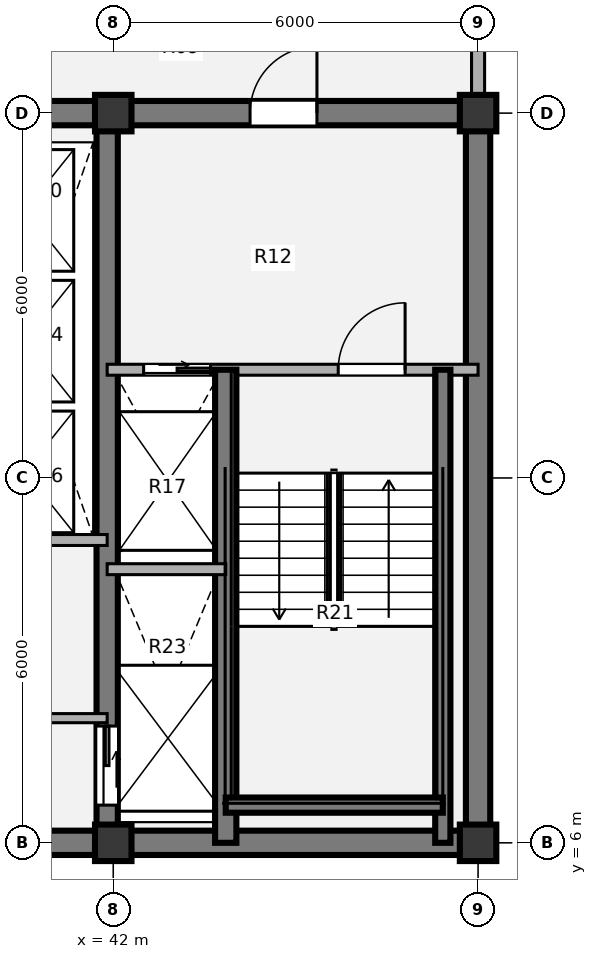
"""IFC4 building model, lengths in metres.
Left out: names, types, materials, properties, quantities, classifications, styles, units other than length and angle.
Written with IfcOpenShell. Run it as: python <this file> out.ifc"""

import sys

from ifc_helpers import new_model, si_unit, direction, frame, frame_2d, origin, origin_2d, place, context, subcontext, project, spatial, rectangle, extrude, source, transform, mapped, element, fill, save


model = new_model("IFC4")
c1 = context("Model", 3, precision=1e-05, world=origin(), true_north=direction((0.0, 1.0)))
c2 = subcontext(c1, "Body", "Model", "MODEL_VIEW")
j1 = project(units=[si_unit("LENGTHUNIT", "METRE"), si_unit("PLANEANGLEUNIT", "RADIAN")], contexts=[c1])
p1 = place(None, origin())
s1 = spatial("IfcSite", under=j1, at=p1, CompositionType="ELEMENT")
p2 = place(p1, origin())
s2 = spatial("IfcBuilding", under=s1, at=p2, CompositionType="ELEMENT")
p3 = place(p2, frame((0.0, 0.0, 257.04)))
s3 = spatial("IfcBuildingStorey", under=s2, at=p3, CompositionType="ELEMENT", Elevation=257.04)
m1 = source(origin(), c2, "Body", "SweptSolid", [
    extrude(rectangle(XDim=0.6, YDim=0.6, at=origin_2d()), origin(), (0.0, 0.0, 1.0), 3.78),
])
for number, where, z_axis, x_axis in (
    (1, (42.0, 6.0, 0.0), (0.0, 0.0, 1.0), (1.0, 0.0, 0.0)),
    (2, (48.0, 6.0, 0.0), (0.0, 0.0, 1.0), (1.0, 0.0, 0.0)),
    (3, (42.0, 18.0, 0.0), (0.0, 0.0, 1.0), (1.0, 0.0, 0.0)),
    (4, (48.0, 18.0, 0.0), (0.0, 0.0, 1.0), (1.0, 0.0, 0.0)),
):
    element("IfcColumn", number, at=place(p3, frame(where, z_axis=z_axis, x_axis=x_axis)), inside=s3, PredefinedType="COLUMN", context=c2, shape_type="MappedRepresentation", body=[
        mapped(m1, transform((0.0, 0.0, 0.0), x_axis=(1.0, 0.0, 0.0), y_axis=(0.0, 1.0, 0.0), z_axis=(0.0, 0.0, 1.0), scale=1.0)),
    ])
p4 = place(p3, frame((48.2, 6.0, 0.0), z_axis=(0.0, 0.0, 1.0), x_axis=(-1.0, 0.0, 0.0)))
e5 = element("IfcWall", 5, at=p4, inside=s3, PredefinedType="SHEAR", context=c2, shape_type="SweptSolid", body=[
    extrude(rectangle(XDim=24.4, YDim=0.4, at=frame_2d((12.2, 0.0))), origin(), (0.0, 0.0, 1.0), 3.78),
])
p5 = place(p3, frame((48.0, 18.0, 0.0), z_axis=(0.0, 0.0, 1.0), x_axis=(0.0, -1.0, 0.0)))
e6 = element("IfcWall", 6, at=p5, inside=s3, PredefinedType="SHEAR", context=c2, shape_type="SweptSolid", body=[
    extrude(rectangle(XDim=12.0, YDim=0.4, at=frame_2d((6.0, 0.0))), origin(), (0.0, 0.0, 1.0), 3.78),
])
p6 = place(p3, frame((38.8, 18.0, 0.0), z_axis=(0.0, 0.0, 1.0), x_axis=(1.0, 0.0, 0.0)))
e7 = element("IfcWall", 7, at=p6, inside=s3, PredefinedType="SHEAR", context=c2, shape_type="SweptSolid", body=[
    extrude(rectangle(XDim=9.4, YDim=0.4, at=frame_2d((4.7, 0.0))), origin(), (0.0, 0.0, 1.0), 3.78),
])
p7 = place(p6, frame((5.45, 0.0, 0.0)))
e8 = element("IfcOpeningElement", 8, at=p7, cuts=e7, PredefinedType="OPENING", context=c2, shape_type="SweptSolid", body=[
    extrude(rectangle(XDim=1.1, YDim=2.1, at=origin_2d()), frame((0.55, 0.21, 1.05), z_axis=(0.0, -1.0, 0.0), x_axis=(1.0, 0.0, 0.0)), (0.0, 0.0, 1.0), 0.42),
])
p8 = place(p3, frame((41.9, 18.0, 0.0), z_axis=(0.0, 0.0, 1.0), x_axis=(0.0, -1.0, 0.0)))
e9 = element("IfcWall", 9, at=p8, inside=s3, PredefinedType="SHEAR", context=c2, shape_type="SweptSolid", body=[
    extrude(rectangle(XDim=12.0, YDim=0.35, at=frame_2d((6.0, 0.0))), origin(), (0.0, 0.0, 1.0), 3.78),
])
p9 = place(p8, frame((10.08, 0.0, 0.0)))
e10 = element("IfcOpeningElement", 10, at=p9, cuts=e9, PredefinedType="OPENING", context=c2, shape_type="SweptSolid", body=[
    extrude(rectangle(XDim=1.3, YDim=2.1, at=origin_2d()), frame((0.65, 0.185, 1.05), z_axis=(0.0, -1.0, 0.0), x_axis=(1.0, 0.0, 0.0)), (0.0, 0.0, 1.0), 0.37),
])
p10 = place(p3, frame((48.0, 21.05, 0.0), z_axis=(0.0, 0.0, 1.0), x_axis=(0.0, -1.0, 0.0)))
e11 = element("IfcWall", 11, at=p10, inside=s3, PredefinedType="SOLIDWALL", context=c2, shape_type="SweptSolid", body=[
    extrude(rectangle(XDim=2.77, YDim=0.215, at=frame_2d((1.385, 0.0))), origin(), (0.0, 0.0, 1.0), 2.718),
])
p11 = place(p3, frame((38.0, 8.05, 0.0), z_axis=(0.0, 0.0, 1.0), x_axis=(1.0, 0.0, 0.0)))
e12 = element("IfcWall", 12, at=p11, inside=s3, PredefinedType="PARTITIONING", context=c2, shape_type="SweptSolid", body=[
    extrude(rectangle(XDim=3.9, YDim=0.15, at=frame_2d((1.95, 0.0))), origin(), (0.0, 0.0, 1.0), 3.5),
])
p12 = place(p11, frame((1.45, 0.0, 0.0)))
e13 = element("IfcOpeningElement", 13, at=p12, cuts=e12, PredefinedType="OPENING", context=c2, shape_type="SweptSolid", body=[
    extrude(rectangle(XDim=0.86, YDim=2.1, at=origin_2d()), frame((0.43, 0.085, 1.05), z_axis=(0.0, -1.0, 0.0), x_axis=(1.0, 0.0, 0.0)), (0.0, 0.0, 1.0), 0.17),
])
p13 = place(p3, frame((38.0, 10.98, 0.0), z_axis=(0.0, 0.0, 1.0), x_axis=(1.0, 0.0, 0.0)))
e14 = element("IfcWall", 14, at=p13, inside=s3, PredefinedType="PARTITIONING", context=c2, shape_type="SweptSolid", body=[
    extrude(rectangle(XDim=3.9, YDim=0.18, at=frame_2d((1.95, 0.0))), origin(), (0.0, 0.0, 1.0), 3.5),
])
p14 = place(p3, frame((41.9, 13.78, 0.0), z_axis=(0.0, 0.0, 1.0), x_axis=(1.0, 0.0, 0.0)))
e15 = element("IfcWall", 15, at=p14, inside=s3, PredefinedType="PARTITIONING", context=c2, shape_type="SweptSolid", body=[
    extrude(rectangle(XDim=6.1, YDim=0.18, at=frame_2d((3.05, 0.0))), origin(), (0.0, 0.0, 1.0), 3.5),
])
p15 = place(p14, frame((0.6, 0.0, 0.0)))
e16 = element("IfcOpeningElement", 16, at=p15, cuts=e15, PredefinedType="OPENING", context=c2, shape_type="SweptSolid", body=[
    extrude(rectangle(XDim=1.1, YDim=2.1, at=origin_2d()), frame((0.55, 0.1, 1.05), z_axis=(0.0, -1.0, 0.0), x_axis=(1.0, 0.0, 0.0)), (0.0, 0.0, 1.0), 0.2),
])
p16 = place(p14, frame((3.8, 0.0, 0.0)))
e17 = element("IfcOpeningElement", 17, at=p16, cuts=e15, PredefinedType="OPENING", context=c2, shape_type="SweptSolid", body=[
    extrude(rectangle(XDim=1.1, YDim=2.1, at=origin_2d()), frame((0.55, 0.1, 1.05), z_axis=(0.0, -1.0, 0.0), x_axis=(1.0, 0.0, 0.0)), (0.0, 0.0, 1.0), 0.2),
])
p17 = place(p3, frame((43.85, 6.0, 0.0), z_axis=(0.0, 0.0, 1.0), x_axis=(0.0, 1.0, 0.0)))
e18 = element("IfcWall", 18, at=p17, inside=s3, PredefinedType="SHEAR", context=c2, shape_type="SweptSolid", body=[
    extrude(rectangle(XDim=7.78, YDim=0.35, at=frame_2d((3.89, 0.0))), origin(), (0.0, 0.0, 1.0), 3.85),
])
p18 = place(p3, frame((47.42, 6.0, 0.0), z_axis=(0.0, 0.0, 1.0), x_axis=(0.0, 1.0, 0.0)))
e19 = element("IfcWall", 19, at=p18, inside=s3, PredefinedType="SHEAR", context=c2, shape_type="SweptSolid", body=[
    extrude(rectangle(XDim=7.78, YDim=0.25, at=frame_2d((3.89, 0.0))), origin(), (0.0, 0.0, 1.0), 3.85),
])
p19 = place(p3, frame((43.85, 6.62, 0.0), z_axis=(0.0, 0.0, 1.0), x_axis=(1.0, 0.0, 0.0)))
e20 = element("IfcWall", 20, at=p19, inside=s3, PredefinedType="SHEAR", context=c2, shape_type="SweptSolid", body=[
    extrude(rectangle(XDim=3.57, YDim=0.25, at=frame_2d((1.785, 0.0))), origin(), (0.0, 0.0, 1.0), 3.85),
])
p20 = place(p3, frame((41.9, 10.5, 0.0), z_axis=(0.0, 0.0, 1.0), x_axis=(1.0, 0.0, 0.0)))
e21 = element("IfcWall", 21, at=p20, inside=s3, PredefinedType="PARTITIONING", context=c2, shape_type="SweptSolid", body=[
    extrude(rectangle(XDim=1.95, YDim=0.18, at=frame_2d((0.975, 0.0))), origin(), (0.0, 0.0, 1.0), 3.5),
])
m2 = source(origin(), c2, "Body", "SweptSolid", [
    extrude(rectangle(XDim=1.1, YDim=2.1, at=origin_2d()), frame((0.55, 0.025, 1.05), z_axis=(0.0, -1.0, 0.0), x_axis=(1.0, 0.0, 0.0)), (0.0, 0.0, 1.0), 0.05),
])
p21 = place(p15, origin())
e22 = element("IfcDoor", 22, at=p21, inside=s3, OperationType="SLIDING_TO_RIGHT", PredefinedType="DOOR", context=c2, shape_type="MappedRepresentation", body=[
    mapped(m2, transform((0.0, 0.0, 0.0), x_axis=(1.0, 0.0, 0.0), y_axis=(0.0, 1.0, 0.0), z_axis=(0.0, 0.0, 1.0), scale=1.0)),
])
fill(e16, e22)
m3 = source(origin(), c2, "Body", "SweptSolid", [
    extrude(rectangle(XDim=1.1, YDim=2.1, at=origin_2d()), frame((0.55, 0.025, 1.05), z_axis=(0.0, -1.0, 0.0), x_axis=(1.0, 0.0, 0.0)), (0.0, 0.0, 1.0), 0.05),
])
p22 = place(p16, origin())
e23 = element("IfcDoor", 23, at=p22, inside=s3, OperationType="SINGLE_SWING_RIGHT", PredefinedType="DOOR", context=c2, shape_type="MappedRepresentation", body=[
    mapped(m3, transform((0.0, 0.0, 0.0), x_axis=(1.0, 0.0, 0.0), y_axis=(0.0, 1.0, 0.0), z_axis=(0.0, 0.0, 1.0), scale=1.0)),
])
fill(e17, e23)
m4 = source(origin(), c2, "Body", "SweptSolid", [
    extrude(rectangle(XDim=1.3, YDim=2.1, at=origin_2d()), frame((0.65, 0.025, 1.05), z_axis=(0.0, -1.0, 0.0), x_axis=(1.0, 0.0, 0.0)), (0.0, 0.0, 1.0), 0.05),
])
p23 = place(p9, origin())
e24 = element("IfcDoor", 24, at=p23, inside=s3, OperationType="SLIDING_TO_LEFT", PredefinedType="DOOR", context=c2, shape_type="MappedRepresentation", body=[
    mapped(m4, transform((0.0, 0.0, 0.0), x_axis=(1.0, 0.0, 0.0), y_axis=(0.0, 1.0, 0.0), z_axis=(0.0, 0.0, 1.0), scale=1.0)),
])
fill(e10, e24)
m5 = source(origin(), c2, "Body", "SweptSolid", [
    extrude(rectangle(XDim=1.1, YDim=2.1, at=origin_2d()), frame((0.55, 0.025, 1.05), z_axis=(0.0, -1.0, 0.0), x_axis=(1.0, 0.0, 0.0)), (0.0, 0.0, 1.0), 0.05),
])
p24 = place(p7, origin())
e25 = element("IfcDoor", 25, at=p24, inside=s3, OperationType="SINGLE_SWING_RIGHT", PredefinedType="DOOR", context=c2, shape_type="MappedRepresentation", body=[
    mapped(m5, transform((0.0, 0.0, 0.0), x_axis=(1.0, 0.0, 0.0), y_axis=(0.0, 1.0, 0.0), z_axis=(0.0, 0.0, 1.0), scale=1.0)),
])
fill(e8, e25)
save(model, sys.argv[1])
